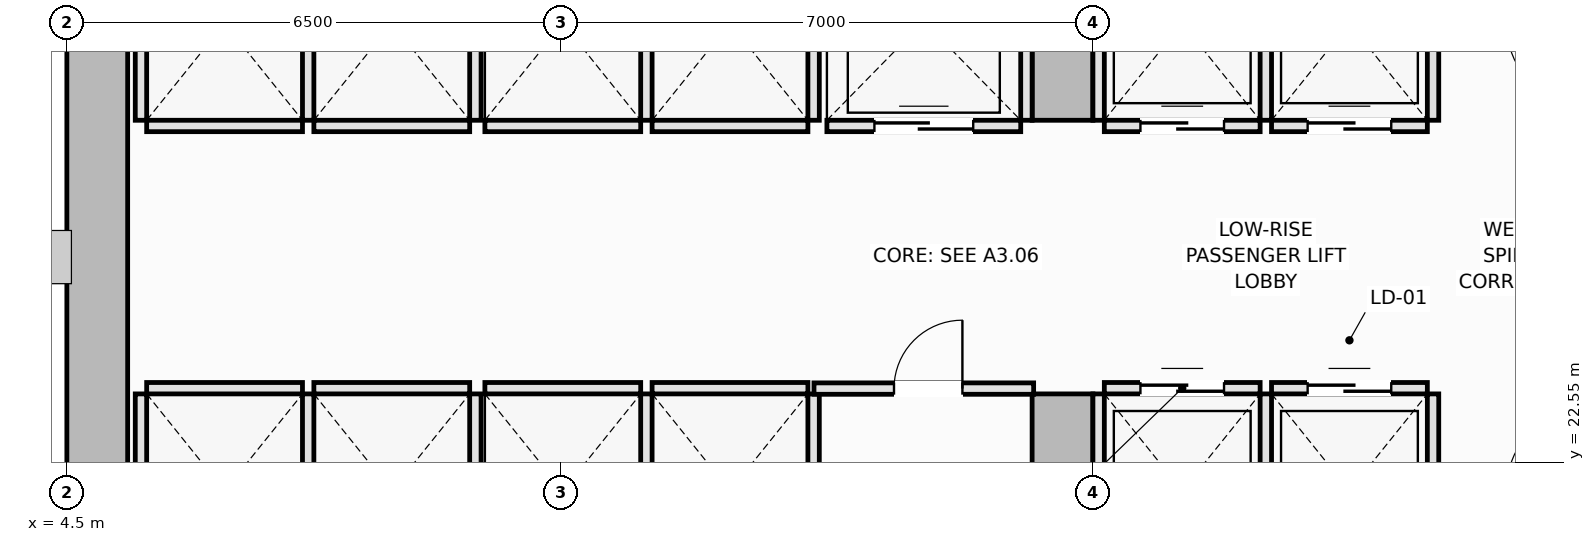
"""IFC4 building model, lengths in metres.
Left out: names, types, materials, properties, quantities, classifications, styles, units other than length and angle.
Written with IfcOpenShell. Run it as: python <this file> out.ifc"""

import sys

from ifc_helpers import new_model, si_unit, direction, frame, frame_2d, origin, place, context, subcontext, project, spatial, rectangle, extrude, element, fill, save


model = new_model("IFC4")
c1 = context("Model", 3, precision=1e-05, world=origin(), true_north=direction((0.0, 1.0)))
c2 = subcontext(c1, "Body", "Model", "MODEL_VIEW")
j1 = project(units=[si_unit("LENGTHUNIT", "METRE"), si_unit("PLANEANGLEUNIT", "RADIAN")], contexts=[c1])
p1 = place(None, origin())
s1 = spatial("IfcSite", under=j1, at=p1, CompositionType="ELEMENT")
p2 = place(p1, origin())
s2 = spatial("IfcBuilding", under=s1, at=p2, CompositionType="ELEMENT")
p3 = place(p2, frame((0.0, 0.0, 39.8)))
s3 = spatial("IfcBuildingStorey", under=s2, at=p3, CompositionType="ELEMENT", Elevation=39.8)
p4 = place(p3, frame((4.9, 14.8, 0.0), z_axis=(0.0, 0.0, 1.0), x_axis=(0.0, 1.0, 0.0)))
e1 = element("IfcWall", 1, at=p4, inside=s3, PredefinedType="SHEAR", context=c2, shape_type="SweptSolid", body=[
    extrude(rectangle(XDim=20.9, YDim=0.8, at=frame_2d((10.45, 0.0))), origin(), (0.0, 0.0, 1.0), 3.55),
])
p5 = place(p3, frame((17.6, 14.8, 0.0), z_axis=(0.0, 0.0, 1.0), x_axis=(0.0, 1.0, 0.0)))
e2 = element("IfcWall", 2, at=p5, inside=s3, PredefinedType="SHEAR", context=c2, shape_type="SweptSolid", body=[
    extrude(rectangle(XDim=8.65, YDim=0.8, at=frame_2d((4.325, 0.0))), origin(), (0.0, 0.0, 1.0), 3.55),
])
p6 = place(p5, frame((4.1, 0.0, 0.0)))
e3 = element("IfcOpeningElement", 3, at=p6, cuts=e2, PredefinedType="OPENING", context=c2, shape_type="SweptSolid", body=[
    extrude(rectangle(XDim=1.1, YDim=2.15, at=frame_2d((0.55, 1.075))), frame((0.0, 0.41, 0.0), z_axis=(0.0, -1.0, 0.0), x_axis=(1.0, 0.0, 0.0)), (0.0, 0.0, 1.0), 0.82),
])
p7 = place(p3, frame((17.6, 27.05, 0.0), z_axis=(0.0, 0.0, 1.0), x_axis=(0.0, 1.0, 0.0)))
e4 = element("IfcWall", 4, at=p7, inside=s3, PredefinedType="SHEAR", context=c2, shape_type="SweptSolid", body=[
    extrude(rectangle(XDim=8.65, YDim=0.8, at=frame_2d((4.325, 0.0))), origin(), (0.0, 0.0, 1.0), 3.55),
])
p8 = place(p7, frame((3.45, 0.0, 0.0)))
e5 = element("IfcOpeningElement", 5, at=p8, cuts=e4, PredefinedType="OPENING", context=c2, shape_type="SweptSolid", body=[
    extrude(rectangle(XDim=1.1, YDim=2.15, at=frame_2d((0.55, 1.075))), frame((0.0, 0.41, 0.0), z_axis=(0.0, -1.0, 0.0), x_axis=(1.0, 0.0, 0.0)), (0.0, 0.0, 1.0), 0.82),
])
p9 = place(p3, frame((18.15, 23.525, 0.0), z_axis=(0.0, 0.0, 1.0), x_axis=(1.0, 0.0, 0.0)))
e6 = element("IfcWall", 6, at=p9, inside=s3, PredefinedType="PARTITIONING", context=c2, shape_type="SweptSolid", body=[
    extrude(rectangle(XDim=2.05, YDim=0.15, at=frame_2d((1.025, 0.0))), origin(), (0.0, 0.0, 1.0), 3.37),
])
p10 = place(p9, frame((0.475, 0.0, 0.0)))
e7 = element("IfcOpeningElement", 7, at=p10, cuts=e6, PredefinedType="OPENING", context=c2, shape_type="SweptSolid", body=[
    extrude(rectangle(XDim=1.1, YDim=2.2, at=frame_2d((0.55, 1.1))), frame((0.0, 0.085, 0.0), z_axis=(0.0, -1.0, 0.0), x_axis=(1.0, 0.0, 0.0)), (0.0, 0.0, 1.0), 0.17),
])
for number, where, z_axis, x_axis in (
    (8, (18.075, 20.9, 0.0), (0.0, 0.0, 1.0), (0.0, 1.0, 0.0)),
    (9, (20.275, 20.9, 0.0), (0.0, 0.0, 1.0), (0.0, 1.0, 0.0)),
):
    element("IfcWall", number, at=place(p3, frame(where, z_axis=z_axis, x_axis=x_axis)), inside=s3, PredefinedType="PARTITIONING", context=c2, shape_type="SweptSolid", body=[
        extrude(rectangle(XDim=2.55, YDim=0.15, at=frame_2d((1.275, 0.0))), origin(), (0.0, 0.0, 1.0), 3.37),
    ])
p11 = place(p3, frame((20.35, 23.525, 0.0), z_axis=(0.0, 0.0, 1.0), x_axis=(1.0, 0.0, 0.0)))
e10 = element("IfcWall", 10, at=p11, inside=s3, PredefinedType="PARTITIONING", context=c2, shape_type="SweptSolid", body=[
    extrude(rectangle(XDim=2.05, YDim=0.15, at=frame_2d((1.025, 0.0))), origin(), (0.0, 0.0, 1.0), 3.37),
])
p12 = place(p11, frame((0.475, 0.0, 0.0)))
e11 = element("IfcOpeningElement", 11, at=p12, cuts=e10, PredefinedType="OPENING", context=c2, shape_type="SweptSolid", body=[
    extrude(rectangle(XDim=1.1, YDim=2.2, at=frame_2d((0.55, 1.1))), frame((0.0, 0.085, 0.0), z_axis=(0.0, -1.0, 0.0), x_axis=(1.0, 0.0, 0.0)), (0.0, 0.0, 1.0), 0.17),
])
p13 = place(p3, frame((22.475, 20.9, 0.0), z_axis=(0.0, 0.0, 1.0), x_axis=(0.0, 1.0, 0.0)))
e12 = element("IfcWall", 12, at=p13, inside=s3, PredefinedType="PARTITIONING", context=c2, shape_type="SweptSolid", body=[
    extrude(rectangle(XDim=2.55, YDim=0.15, at=frame_2d((1.275, 0.0))), origin(), (0.0, 0.0, 1.0), 3.37),
])
p14 = place(p3, frame((18.15, 26.975, 0.0), z_axis=(0.0, 0.0, 1.0), x_axis=(1.0, 0.0, 0.0)))
e13 = element("IfcWall", 13, at=p14, inside=s3, PredefinedType="PARTITIONING", context=c2, shape_type="SweptSolid", body=[
    extrude(rectangle(XDim=2.05, YDim=0.15, at=frame_2d((1.025, 0.0))), origin(), (0.0, 0.0, 1.0), 3.37),
])
p15 = place(p14, frame((0.475, 0.0, 0.0)))
e14 = element("IfcOpeningElement", 14, at=p15, cuts=e13, PredefinedType="OPENING", context=c2, shape_type="SweptSolid", body=[
    extrude(rectangle(XDim=1.1, YDim=2.2, at=frame_2d((0.55, 1.1))), frame((0.0, 0.085, 0.0), z_axis=(0.0, -1.0, 0.0), x_axis=(1.0, 0.0, 0.0)), (0.0, 0.0, 1.0), 0.17),
])
for number, where, z_axis, x_axis in (
    (15, (18.075, 27.05, 0.0), (0.0, 0.0, 1.0), (0.0, 1.0, 0.0)),
    (16, (20.275, 27.05, 0.0), (0.0, 0.0, 1.0), (0.0, 1.0, 0.0)),
):
    element("IfcWall", number, at=place(p3, frame(where, z_axis=z_axis, x_axis=x_axis)), inside=s3, PredefinedType="PARTITIONING", context=c2, shape_type="SweptSolid", body=[
        extrude(rectangle(XDim=2.55, YDim=0.15, at=frame_2d((1.275, 0.0))), origin(), (0.0, 0.0, 1.0), 3.37),
    ])
p16 = place(p3, frame((20.35, 26.975, 0.0), z_axis=(0.0, 0.0, 1.0), x_axis=(1.0, 0.0, 0.0)))
e17 = element("IfcWall", 17, at=p16, inside=s3, PredefinedType="PARTITIONING", context=c2, shape_type="SweptSolid", body=[
    extrude(rectangle(XDim=2.05, YDim=0.15, at=frame_2d((1.025, 0.0))), origin(), (0.0, 0.0, 1.0), 3.37),
])
p17 = place(p16, frame((0.475, 0.0, 0.0)))
e18 = element("IfcOpeningElement", 18, at=p17, cuts=e17, PredefinedType="OPENING", context=c2, shape_type="SweptSolid", body=[
    extrude(rectangle(XDim=1.1, YDim=2.2, at=frame_2d((0.55, 1.1))), frame((0.0, 0.085, 0.0), z_axis=(0.0, -1.0, 0.0), x_axis=(1.0, 0.0, 0.0)), (0.0, 0.0, 1.0), 0.17),
])
p18 = place(p3, frame((22.475, 27.05, 0.0), z_axis=(0.0, 0.0, 1.0), x_axis=(0.0, 1.0, 0.0)))
e19 = element("IfcWall", 19, at=p18, inside=s3, PredefinedType="PARTITIONING", context=c2, shape_type="SweptSolid", body=[
    extrude(rectangle(XDim=2.55, YDim=0.15, at=frame_2d((1.275, 0.0))), origin(), (0.0, 0.0, 1.0), 3.37),
])
p19 = place(p3, frame((5.55, 23.525, 0.0), z_axis=(0.0, 0.0, 1.0), x_axis=(1.0, 0.0, 0.0)))
e20 = element("IfcWall", 20, at=p19, inside=s3, PredefinedType="PARTITIONING", context=c2, shape_type="SweptSolid", body=[
    extrude(rectangle(XDim=2.05, YDim=0.15, at=frame_2d((1.025, 0.0))), origin(), (0.0, 0.0, 1.0), 3.37),
])
for number, where, z_axis, x_axis in (
    (21, (5.475, 20.9, 0.0), (0.0, 0.0, 1.0), (0.0, 1.0, 0.0)),
    (22, (7.675, 20.9, 0.0), (0.0, 0.0, 1.0), (0.0, 1.0, 0.0)),
):
    element("IfcWall", number, at=place(p3, frame(where, z_axis=z_axis, x_axis=x_axis)), inside=s3, PredefinedType="PARTITIONING", context=c2, shape_type="SweptSolid", body=[
        extrude(rectangle(XDim=2.55, YDim=0.15, at=frame_2d((1.275, 0.0))), origin(), (0.0, 0.0, 1.0), 3.37),
    ])
p20 = place(p3, frame((7.75, 23.525, 0.0), z_axis=(0.0, 0.0, 1.0), x_axis=(1.0, 0.0, 0.0)))
e23 = element("IfcWall", 23, at=p20, inside=s3, PredefinedType="PARTITIONING", context=c2, shape_type="SweptSolid", body=[
    extrude(rectangle(XDim=2.05, YDim=0.15, at=frame_2d((1.025, 0.0))), origin(), (0.0, 0.0, 1.0), 3.37),
])
p21 = place(p3, frame((9.875, 20.9, 0.0), z_axis=(0.0, 0.0, 1.0), x_axis=(0.0, 1.0, 0.0)))
e24 = element("IfcWall", 24, at=p21, inside=s3, PredefinedType="PARTITIONING", context=c2, shape_type="SweptSolid", body=[
    extrude(rectangle(XDim=2.55, YDim=0.15, at=frame_2d((1.275, 0.0))), origin(), (0.0, 0.0, 1.0), 3.37),
])
p22 = place(p3, frame((5.55, 26.975, 0.0), z_axis=(0.0, 0.0, 1.0), x_axis=(1.0, 0.0, 0.0)))
e25 = element("IfcWall", 25, at=p22, inside=s3, PredefinedType="PARTITIONING", context=c2, shape_type="SweptSolid", body=[
    extrude(rectangle(XDim=2.05, YDim=0.15, at=frame_2d((1.025, 0.0))), origin(), (0.0, 0.0, 1.0), 3.37),
])
for number, where, z_axis, x_axis in (
    (26, (5.475, 27.05, 0.0), (0.0, 0.0, 1.0), (0.0, 1.0, 0.0)),
    (27, (7.675, 27.05, 0.0), (0.0, 0.0, 1.0), (0.0, 1.0, 0.0)),
):
    element("IfcWall", number, at=place(p3, frame(where, z_axis=z_axis, x_axis=x_axis)), inside=s3, PredefinedType="PARTITIONING", context=c2, shape_type="SweptSolid", body=[
        extrude(rectangle(XDim=2.55, YDim=0.15, at=frame_2d((1.275, 0.0))), origin(), (0.0, 0.0, 1.0), 3.37),
    ])
p23 = place(p3, frame((7.75, 26.975, 0.0), z_axis=(0.0, 0.0, 1.0), x_axis=(1.0, 0.0, 0.0)))
e28 = element("IfcWall", 28, at=p23, inside=s3, PredefinedType="PARTITIONING", context=c2, shape_type="SweptSolid", body=[
    extrude(rectangle(XDim=2.05, YDim=0.15, at=frame_2d((1.025, 0.0))), origin(), (0.0, 0.0, 1.0), 3.37),
])
p24 = place(p3, frame((9.875, 27.05, 0.0), z_axis=(0.0, 0.0, 1.0), x_axis=(0.0, 1.0, 0.0)))
e29 = element("IfcWall", 29, at=p24, inside=s3, PredefinedType="PARTITIONING", context=c2, shape_type="SweptSolid", body=[
    extrude(rectangle(XDim=2.55, YDim=0.15, at=frame_2d((1.275, 0.0))), origin(), (0.0, 0.0, 1.0), 3.37),
])
p25 = place(p3, frame((10.0, 23.525, 0.0), z_axis=(0.0, 0.0, 1.0), x_axis=(1.0, 0.0, 0.0)))
e30 = element("IfcWall", 30, at=p25, inside=s3, PredefinedType="PARTITIONING", context=c2, shape_type="SweptSolid", body=[
    extrude(rectangle(XDim=2.05, YDim=0.15, at=frame_2d((1.025, 0.0))), origin(), (0.0, 0.0, 1.0), 3.37),
])
p26 = place(p3, frame((12.125, 20.9, 0.0), z_axis=(0.0, 0.0, 1.0), x_axis=(0.0, 1.0, 0.0)))
e31 = element("IfcWall", 31, at=p26, inside=s3, PredefinedType="PARTITIONING", context=c2, shape_type="SweptSolid", body=[
    extrude(rectangle(XDim=2.55, YDim=0.15, at=frame_2d((1.275, 0.0))), origin(), (0.0, 0.0, 1.0), 3.37),
])
p27 = place(p3, frame((12.2, 23.525, 0.0), z_axis=(0.0, 0.0, 1.0), x_axis=(1.0, 0.0, 0.0)))
e32 = element("IfcWall", 32, at=p27, inside=s3, PredefinedType="PARTITIONING", context=c2, shape_type="SweptSolid", body=[
    extrude(rectangle(XDim=2.05, YDim=0.15, at=frame_2d((1.025, 0.0))), origin(), (0.0, 0.0, 1.0), 3.37),
])
p28 = place(p3, frame((14.325, 20.9, 0.0), z_axis=(0.0, 0.0, 1.0), x_axis=(0.0, 1.0, 0.0)))
e33 = element("IfcWall", 33, at=p28, inside=s3, PredefinedType="PARTITIONING", context=c2, shape_type="SweptSolid", body=[
    extrude(rectangle(XDim=2.55, YDim=0.15, at=frame_2d((1.275, 0.0))), origin(), (0.0, 0.0, 1.0), 3.37),
])
p29 = place(p3, frame((10.0, 26.975, 0.0), z_axis=(0.0, 0.0, 1.0), x_axis=(1.0, 0.0, 0.0)))
e34 = element("IfcWall", 34, at=p29, inside=s3, PredefinedType="PARTITIONING", context=c2, shape_type="SweptSolid", body=[
    extrude(rectangle(XDim=2.05, YDim=0.15, at=frame_2d((1.025, 0.0))), origin(), (0.0, 0.0, 1.0), 3.37),
])
p30 = place(p3, frame((12.125, 27.05, 0.0), z_axis=(0.0, 0.0, 1.0), x_axis=(0.0, 1.0, 0.0)))
e35 = element("IfcWall", 35, at=p30, inside=s3, PredefinedType="PARTITIONING", context=c2, shape_type="SweptSolid", body=[
    extrude(rectangle(XDim=2.55, YDim=0.15, at=frame_2d((1.275, 0.0))), origin(), (0.0, 0.0, 1.0), 3.37),
])
p31 = place(p3, frame((12.2, 26.975, 0.0), z_axis=(0.0, 0.0, 1.0), x_axis=(1.0, 0.0, 0.0)))
e36 = element("IfcWall", 36, at=p31, inside=s3, PredefinedType="PARTITIONING", context=c2, shape_type="SweptSolid", body=[
    extrude(rectangle(XDim=2.05, YDim=0.15, at=frame_2d((1.025, 0.0))), origin(), (0.0, 0.0, 1.0), 3.37),
])
p32 = place(p3, frame((14.325, 27.05, 0.0), z_axis=(0.0, 0.0, 1.0), x_axis=(0.0, 1.0, 0.0)))
e37 = element("IfcWall", 37, at=p32, inside=s3, PredefinedType="PARTITIONING", context=c2, shape_type="SweptSolid", body=[
    extrude(rectangle(XDim=2.55, YDim=0.15, at=frame_2d((1.275, 0.0))), origin(), (0.0, 0.0, 1.0), 3.37),
])
p33 = place(p3, frame((14.5, 26.975, 0.0), z_axis=(0.0, 0.0, 1.0), x_axis=(1.0, 0.0, 0.0)))
e38 = element("IfcWall", 38, at=p33, inside=s3, PredefinedType="PARTITIONING", context=c2, shape_type="SweptSolid", body=[
    extrude(rectangle(XDim=2.55, YDim=0.15, at=frame_2d((1.275, 0.0))), origin(), (0.0, 0.0, 1.0), 3.37),
])
p34 = place(p33, frame((0.625, 0.0, 0.0)))
e39 = element("IfcOpeningElement", 39, at=p34, cuts=e38, PredefinedType="OPENING", context=c2, shape_type="SweptSolid", body=[
    extrude(rectangle(XDim=1.3, YDim=2.2, at=frame_2d((0.65, 1.1))), frame((0.0, 0.085, 0.0), z_axis=(0.0, -1.0, 0.0), x_axis=(1.0, 0.0, 0.0)), (0.0, 0.0, 1.0), 0.17),
])
p35 = place(p3, frame((17.125, 27.05, 0.0), z_axis=(0.0, 0.0, 1.0), x_axis=(0.0, 1.0, 0.0)))
e40 = element("IfcWall", 40, at=p35, inside=s3, PredefinedType="PARTITIONING", context=c2, shape_type="SweptSolid", body=[
    extrude(rectangle(XDim=2.6, YDim=0.15, at=frame_2d((1.3, 0.0))), origin(), (0.0, 0.0, 1.0), 3.37),
])
p36 = place(p3, frame((14.33, 23.52, 0.0), z_axis=(0.0, 0.0, 1.0), x_axis=(1.0, 0.0, 0.0)))
e41 = element("IfcWall", 41, at=p36, inside=s3, PredefinedType="PARTITIONING", context=c2, shape_type="SweptSolid", body=[
    extrude(rectangle(XDim=2.89, YDim=0.15, at=frame_2d((1.445, 0.0))), origin(), (0.0, 0.0, 1.0), 3.37),
])
p37 = place(p36, frame((1.053, 0.0, 0.0)))
e42 = element("IfcOpeningElement", 42, at=p37, cuts=e41, PredefinedType="OPENING", context=c2, shape_type="SweptSolid", body=[
    extrude(rectangle(XDim=0.9, YDim=2.1, at=frame_2d((0.45, 1.05))), frame((0.0, 0.085, 0.0), z_axis=(0.0, -1.0, 0.0), x_axis=(1.0, 0.0, 0.0)), (0.0, 0.0, 1.0), 0.17),
])
p38 = place(p10, origin())
e43 = element("IfcDoor", 43, at=p38, inside=s3, OperationType="DOUBLE_DOOR_SLIDING", PredefinedType="DOOR", context=c2, shape_type="SweptSolid", body=[
    extrude(rectangle(XDim=1.1, YDim=2.2, at=frame_2d((0.55, 1.1))), frame((0.0, 0.025, 0.0), z_axis=(0.0, -1.0, 0.0), x_axis=(1.0, 0.0, 0.0)), (0.0, 0.0, 1.0), 0.05),
])
fill(e7, e43)
p39 = place(p12, origin())
e44 = element("IfcDoor", 44, at=p39, inside=s3, OperationType="DOUBLE_DOOR_SLIDING", PredefinedType="DOOR", context=c2, shape_type="SweptSolid", body=[
    extrude(rectangle(XDim=1.1, YDim=2.2, at=frame_2d((0.55, 1.1))), frame((0.0, 0.025, 0.0), z_axis=(0.0, -1.0, 0.0), x_axis=(1.0, 0.0, 0.0)), (0.0, 0.0, 1.0), 0.05),
])
fill(e11, e44)
p40 = place(p15, origin())
e45 = element("IfcDoor", 45, at=p40, inside=s3, OperationType="DOUBLE_DOOR_SLIDING", PredefinedType="DOOR", context=c2, shape_type="SweptSolid", body=[
    extrude(rectangle(XDim=1.1, YDim=2.2, at=frame_2d((0.55, 1.1))), frame((0.0, 0.025, 0.0), z_axis=(0.0, -1.0, 0.0), x_axis=(1.0, 0.0, 0.0)), (0.0, 0.0, 1.0), 0.05),
])
fill(e14, e45)
p41 = place(p17, origin())
e46 = element("IfcDoor", 46, at=p41, inside=s3, OperationType="DOUBLE_DOOR_SLIDING", PredefinedType="DOOR", context=c2, shape_type="SweptSolid", body=[
    extrude(rectangle(XDim=1.1, YDim=2.2, at=frame_2d((0.55, 1.1))), frame((0.0, 0.025, 0.0), z_axis=(0.0, -1.0, 0.0), x_axis=(1.0, 0.0, 0.0)), (0.0, 0.0, 1.0), 0.05),
])
fill(e18, e46)
p42 = place(p34, origin())
e47 = element("IfcDoor", 47, at=p42, inside=s3, OperationType="DOUBLE_DOOR_SLIDING", PredefinedType="DOOR", context=c2, shape_type="SweptSolid", body=[
    extrude(rectangle(XDim=1.3, YDim=2.2, at=frame_2d((0.65, 1.1))), frame((0.0, 0.025, 0.0), z_axis=(0.0, -1.0, 0.0), x_axis=(1.0, 0.0, 0.0)), (0.0, 0.0, 1.0), 0.05),
])
fill(e39, e47)
p43 = place(p37, origin())
e48 = element("IfcDoor", 48, at=p43, inside=s3, OperationType="SINGLE_SWING_RIGHT", PredefinedType="DOOR", context=c2, shape_type="SweptSolid", body=[
    extrude(rectangle(XDim=0.9, YDim=2.1, at=frame_2d((0.45, 1.05))), frame((0.0, 0.025, 0.0), z_axis=(0.0, -1.0, 0.0), x_axis=(1.0, 0.0, 0.0)), (0.0, 0.0, 1.0), 0.05),
])
fill(e42, e48)
save(model, sys.argv[1])
